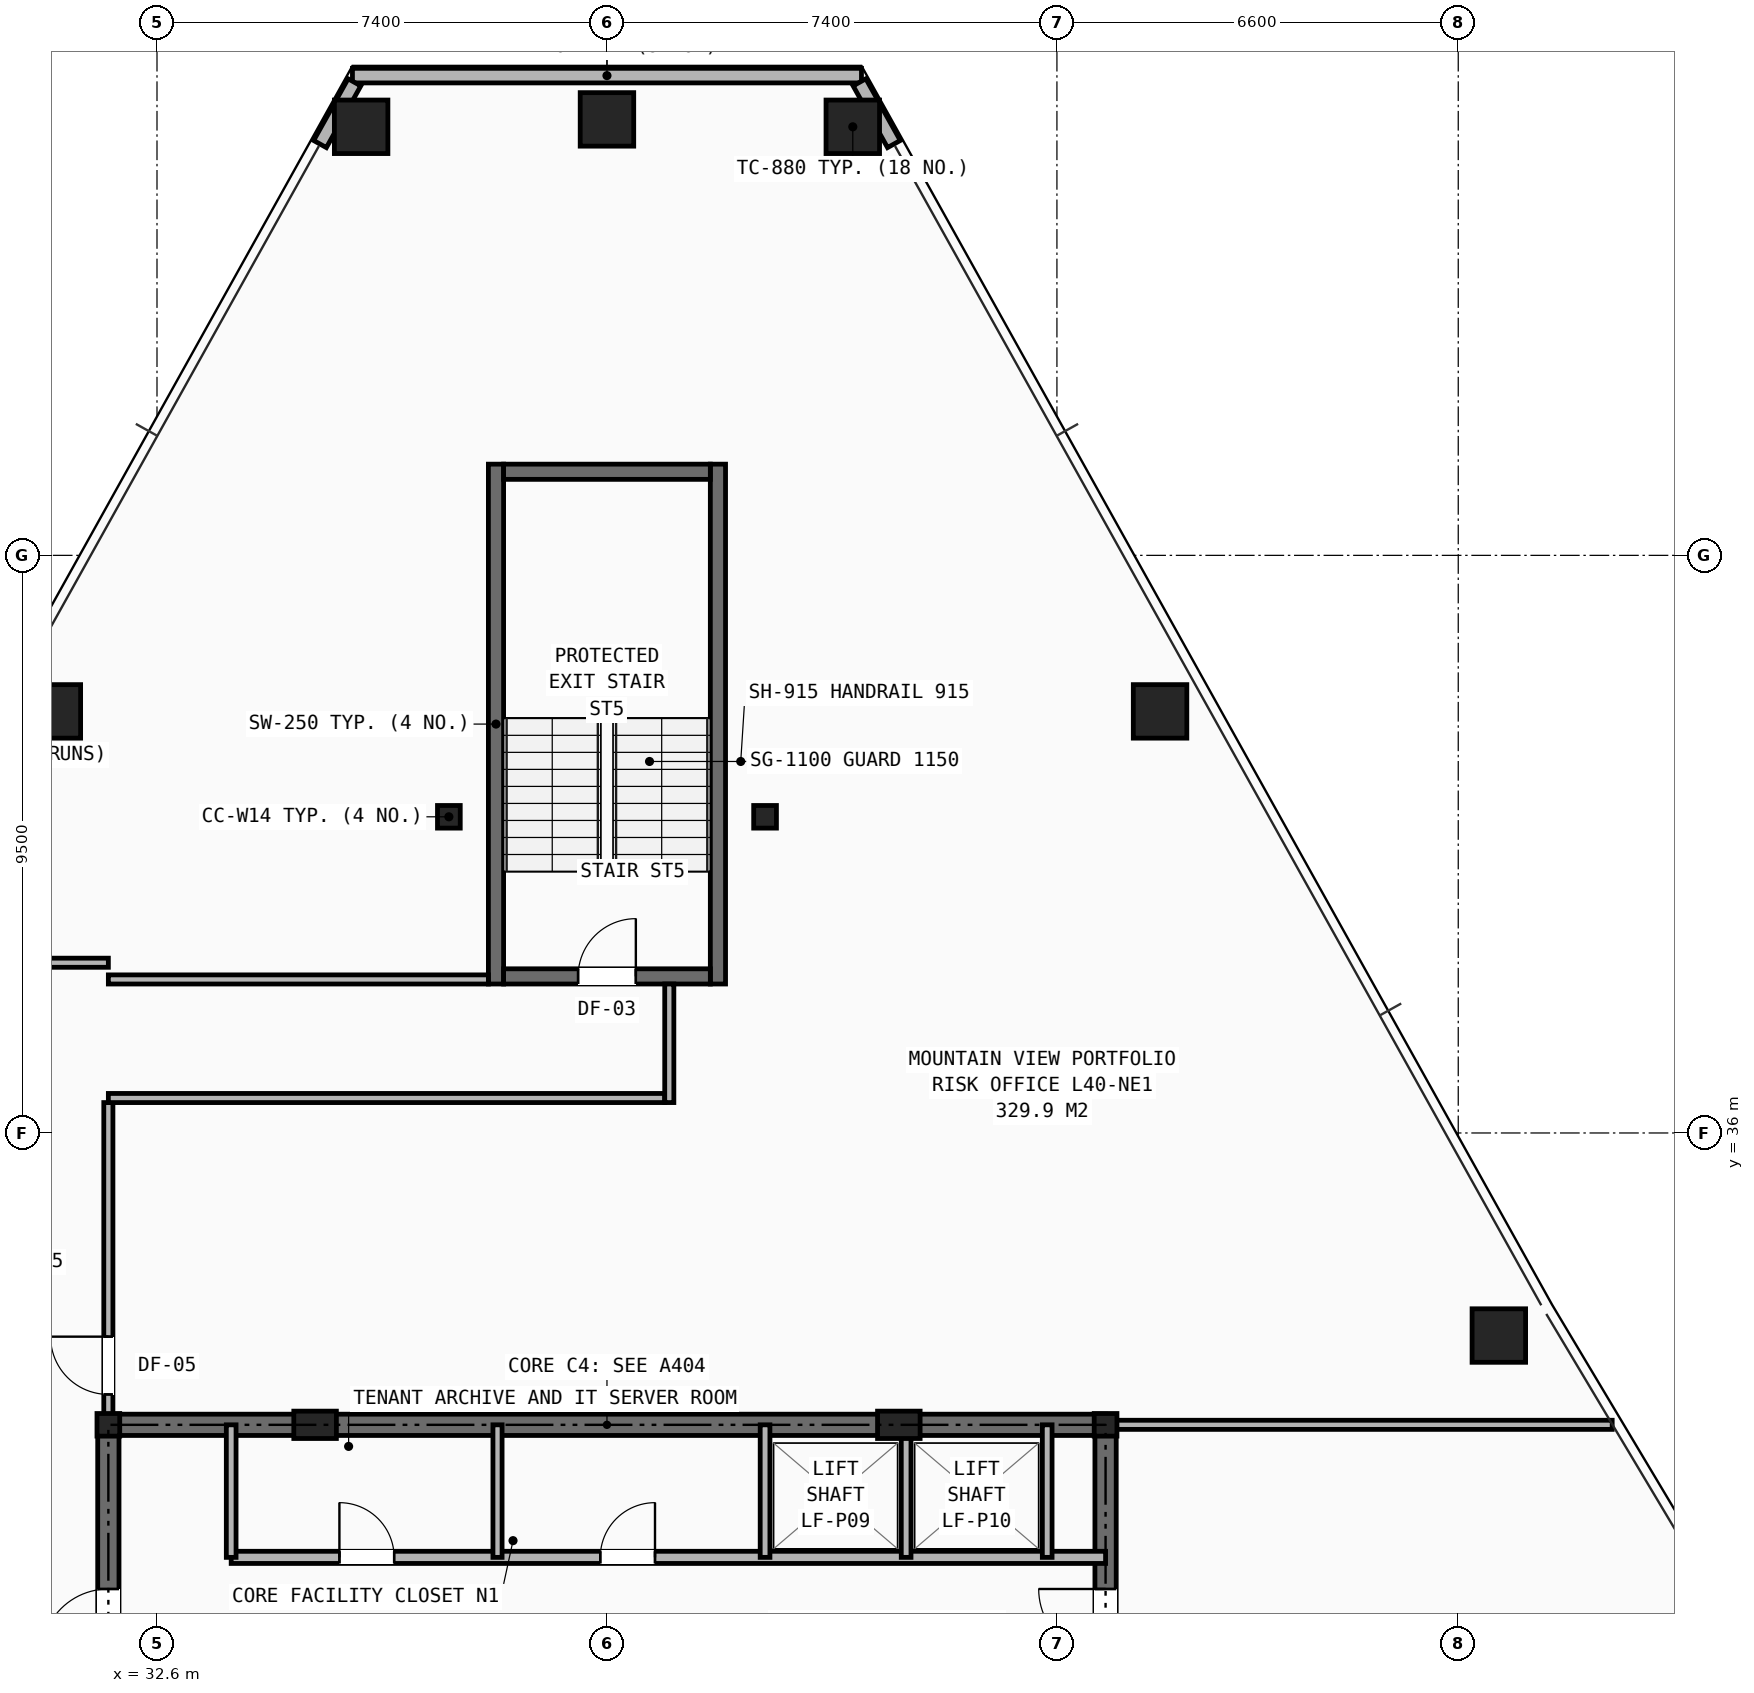
"""IFC4 building model, lengths in metres.
Left out: names, types, materials, properties, quantities, classifications, styles, units other than length and angle.
Written with IfcOpenShell. Run it as: python <this file> out.ifc"""

import sys

from ifc_helpers import new_model, si_unit, direction, frame, frame_2d, origin, origin_2d, place, context, subcontext, project, spatial, rectangle, hollow_rectangle, i_section, extrude, element, fill, save


model = new_model("IFC4")
c1 = context("Model", 3, precision=1e-05, world=origin(), true_north=direction((0.0, 1.0)))
c2 = subcontext(c1, "Body", "Model", "MODEL_VIEW")
j1 = project(units=[si_unit("LENGTHUNIT", "METRE"), si_unit("PLANEANGLEUNIT", "RADIAN")], contexts=[c1])
p1 = place(None, origin())
s1 = spatial("IfcSite", under=j1, at=p1, CompositionType="ELEMENT")
p2 = place(p1, origin())
s2 = spatial("IfcBuilding", under=s1, at=p2, CompositionType="ELEMENT")
p3 = place(p2, frame((0.0, 0.0, 140.15)))
s3 = spatial("IfcBuildingStorey", under=s2, at=p3, CompositionType="ELEMENT", Elevation=140.15)
for number, where, z_axis, x_axis in (
    (1, (31.8, 31.2, 0.0), (0.0, 0.0, 1.0), (1.0, 0.0, 0.0)),
    (2, (48.2, 31.2, 0.0), (0.0, 0.0, 1.0), (1.0, 0.0, 0.0)),
    (3, (37.4, 41.2, 0.0), (0.0, 0.0, 1.0), (1.0, 0.0, 0.0)),
    (4, (42.6, 41.2, 0.0), (0.0, 0.0, 1.0), (1.0, 0.0, 0.0)),
):
    element("IfcColumn", number, at=place(p3, frame(where, z_axis=z_axis, x_axis=x_axis)), inside=s3, PredefinedType="COLUMN", context=c2, shape_type="SweptSolid", body=[
        extrude(i_section(OverallWidth=0.374, OverallDepth=0.372, WebThickness=0.016, FlangeThickness=0.026, at=origin_2d()), origin(), (0.0, 0.0, 1.0), 3.45),
    ])
for number, where, z_axis, x_axis in (
    (5, (35.2, 31.2, 0.0), (0.0, 0.0, 1.0), (1.0, 0.0, 0.0)),
    (6, (44.8, 31.2, 0.0), (0.0, 0.0, 1.0), (1.0, 0.0, 0.0)),
):
    element("IfcColumn", number, at=place(p3, frame(where, z_axis=z_axis, x_axis=x_axis)), inside=s3, PredefinedType="PILASTER", context=c2, shape_type="SweptSolid", body=[
        extrude(rectangle(XDim=0.7, YDim=0.45, at=origin_2d()), origin(), (0.0, 0.0, 1.0), 3.45),
    ])
for number, where, z_axis, x_axis in (
    (7, (44.043, 52.548, 0.0), (0.0, 0.0, 1.0), (1.0, 0.0, 0.0)),
    (8, (40.0, 52.67, 0.0), (0.0, 0.0, 1.0), (1.0, 0.0, 0.0)),
    (9, (35.957, 52.548, 0.0), (0.0, 0.0, 1.0), (1.0, 0.0, 0.0)),
    (10, (30.904, 42.934, 0.0), (0.0, 0.0, 1.0), (1.0, 0.0, 0.0)),
    (11, (54.667, 32.668, 0.0), (0.0, 0.0, 1.0), (1.0, 0.0, 0.0)),
    (12, (49.096, 42.934, 0.0), (0.0, 0.0, 1.0), (1.0, 0.0, 0.0)),
):
    element("IfcColumn", number, at=place(p3, frame(where, z_axis=z_axis, x_axis=x_axis)), inside=s3, PredefinedType="COLUMN", context=c2, shape_type="SweptSolid", body=[
        extrude(hollow_rectangle(XDim=0.88, YDim=0.88, WallThickness=0.06, at=origin_2d()), origin(), (0.0, 0.0, 1.0), 3.45),
    ])
p4 = place(p3, frame((35.814, 53.39, 0.0), z_axis=(0.0, 0.0, 1.0), x_axis=(1.0, 0.0, 0.0)))
e13 = element("IfcWall", 13, at=p4, inside=s3, PredefinedType="SHEAR", context=c2, shape_type="SweptSolid", body=[
    extrude(rectangle(XDim=8.372, YDim=0.24, at=frame_2d((4.186, 0.0))), origin(), (0.0, 0.0, 1.0), 2.583),
])
for number, where, z_axis, x_axis in (
    (14, (35.847, 53.28, 0.0), (0.0, 0.0, 1.0), (-0.487, -0.873, 0.0)),
    (15, (44.719, 52.265, 0.0), (0.0, 0.0, 1.0), (-0.487, 0.873, 0.0)),
):
    element("IfcWall", number, at=place(p3, frame(where, z_axis=z_axis, x_axis=x_axis)), inside=s3, PredefinedType="SHEAR", context=c2, shape_type="SweptSolid", body=[
        extrude(rectangle(XDim=1.162, YDim=0.24, at=frame_2d((0.581, 0.0))), origin(), (0.0, 0.0, 1.0), 2.583),
    ])
p5 = place(p3, frame((31.8, 31.2, 0.0), z_axis=(0.0, 0.0, 1.0), x_axis=(1.0, 0.0, 0.0)))
e16 = element("IfcWall", 16, at=p5, inside=s3, PredefinedType="SHEAR", context=c2, shape_type="SweptSolid", body=[
    extrude(rectangle(XDim=16.4, YDim=0.35, at=frame_2d((8.2, 0.0))), origin(), (0.0, 0.0, 1.0), 3.21),
])
p6 = place(p3, frame((31.8, 16.4, 0.0), z_axis=(0.0, 0.0, 1.0), x_axis=(0.0, 1.0, 0.0)))
e17 = element("IfcWall", 17, at=p6, inside=s3, PredefinedType="SHEAR", context=c2, shape_type="SweptSolid", body=[
    extrude(rectangle(XDim=14.8, YDim=0.35, at=frame_2d((7.4, 0.0))), origin(), (0.0, 0.0, 1.0), 3.21),
])
p7 = place(p6, frame((11.0, 0.0, 0.0)))
e18 = element("IfcOpeningElement", 18, at=p7, cuts=e17, PredefinedType="OPENING", context=c2, shape_type="SweptSolid", body=[
    extrude(rectangle(XDim=1.1, YDim=2.15, at=frame_2d((0.55, 1.075))), frame((0.0, 0.185, 0.0), z_axis=(0.0, -1.0, 0.0), x_axis=(1.0, 0.0, 0.0)), (0.0, 0.0, 1.0), 0.37),
])
p8 = place(p3, frame((48.2, 16.4, 0.0), z_axis=(0.0, 0.0, 1.0), x_axis=(0.0, 1.0, 0.0)))
e19 = element("IfcWall", 19, at=p8, inside=s3, PredefinedType="SHEAR", context=c2, shape_type="SweptSolid", body=[
    extrude(rectangle(XDim=14.8, YDim=0.35, at=frame_2d((7.4, 0.0))), origin(), (0.0, 0.0, 1.0), 3.21),
])
p9 = place(p8, frame((11.0, 0.0, 0.0)))
e20 = element("IfcOpeningElement", 20, at=p9, cuts=e19, PredefinedType="OPENING", context=c2, shape_type="SweptSolid", body=[
    extrude(rectangle(XDim=1.1, YDim=2.15, at=frame_2d((0.55, 1.075))), frame((0.0, 0.185, 0.0), z_axis=(0.0, -1.0, 0.0), x_axis=(1.0, 0.0, 0.0)), (0.0, 0.0, 1.0), 0.37),
])
p10 = place(p3, frame((33.82, 29.02, 0.0), z_axis=(0.0, 0.0, 1.0), x_axis=(1.0, 0.0, 0.0)))
e21 = element("IfcWall", 21, at=p10, inside=s3, PredefinedType="SOLIDWALL", context=c2, shape_type="SweptSolid", body=[
    extrude(rectangle(XDim=14.38, YDim=0.2, at=frame_2d((7.19, 0.0))), origin(), (0.0, 0.0, 1.0), 2.661),
])
p11 = place(p10, frame((1.78, 0.0, 0.0)))
e22 = element("IfcOpeningElement", 22, at=p11, cuts=e21, PredefinedType="OPENING", context=c2, shape_type="SweptSolid", body=[
    extrude(rectangle(XDim=0.9, YDim=2.1, at=frame_2d((0.45, 1.05))), frame((0.0, 0.11, 0.0), z_axis=(0.0, -1.0, 0.0), x_axis=(1.0, 0.0, 0.0)), (0.0, 0.0, 1.0), 0.22),
])
p12 = place(p10, frame((6.07, 0.0, 0.0)))
e23 = element("IfcOpeningElement", 23, at=p12, cuts=e21, PredefinedType="OPENING", context=c2, shape_type="SweptSolid", body=[
    extrude(rectangle(XDim=0.9, YDim=2.1, at=frame_2d((0.45, 1.05))), frame((0.0, 0.11, 0.0), z_axis=(0.0, -1.0, 0.0), x_axis=(1.0, 0.0, 0.0)), (0.0, 0.0, 1.0), 0.22),
])
p13 = place(p3, frame((33.82, 29.02, 0.0), z_axis=(0.0, 0.0, 1.0), x_axis=(0.0, 1.0, 0.0)))
e24 = element("IfcWall", 24, at=p13, inside=s3, PredefinedType="SOLIDWALL", context=c2, shape_type="SweptSolid", body=[
    extrude(rectangle(XDim=2.18, YDim=0.16, at=frame_2d((1.09, 0.0))), origin(), (0.0, 0.0, 1.0), 2.938),
])
p14 = place(p3, frame((38.2, 29.02, 0.0), z_axis=(0.0, 0.0, 1.0), x_axis=(0.0, 1.0, 0.0)))
e25 = element("IfcWall", 25, at=p14, inside=s3, PredefinedType="PARTITIONING", context=c2, shape_type="SweptSolid", body=[
    extrude(rectangle(XDim=2.18, YDim=0.15, at=frame_2d((1.09, 0.0))), origin(), (0.0, 0.0, 1.0), 2.938),
])
for number, where, z_axis, x_axis in (
    (26, (42.6, 29.02, 0.0), (0.0, 0.0, 1.0), (0.0, 1.0, 0.0)),
    (27, (44.92, 29.02, 0.0), (0.0, 0.0, 1.0), (0.0, 1.0, 0.0)),
    (28, (47.24, 29.02, 0.0), (0.0, 0.0, 1.0), (0.0, 1.0, 0.0)),
):
    element("IfcWall", number, at=place(p3, frame(where, z_axis=z_axis, x_axis=x_axis)), inside=s3, PredefinedType="SOLIDWALL", context=c2, shape_type="SweptSolid", body=[
        extrude(rectangle(XDim=2.18, YDim=0.16, at=frame_2d((1.09, 0.0))), origin(), (0.0, 0.0, 1.0), 2.938),
    ])
p15 = place(p3, frame((31.8, 31.2, 0.0), z_axis=(0.0, 0.0, 1.0), x_axis=(0.0, 1.0, 0.0)))
e29 = element("IfcWall", 29, at=p15, inside=s3, PredefinedType="PARTITIONING", context=c2, shape_type="SweptSolid", body=[
    extrude(rectangle(XDim=5.3, YDim=0.15, at=frame_2d((2.65, 0.0))), origin(), (0.0, 0.0, 1.0), 2.252),
])
p16 = place(p15, frame((0.5, 0.0, 0.0)))
e30 = element("IfcOpeningElement", 30, at=p16, cuts=e29, PredefinedType="OPENING", context=c2, shape_type="SweptSolid", body=[
    extrude(rectangle(XDim=0.95, YDim=2.1, at=frame_2d((0.475, 1.05))), frame((0.0, 0.085, 0.0), z_axis=(0.0, -1.0, 0.0), x_axis=(1.0, 0.0, 0.0)), (0.0, 0.0, 1.0), 0.17),
])
p17 = place(p3, frame((29.6, 38.8, 0.0), z_axis=(0.0, 0.0, 1.0), x_axis=(1.0, 0.0, 0.0)))
e31 = element("IfcWall", 31, at=p17, inside=s3, PredefinedType="PARTITIONING", context=c2, shape_type="SweptSolid", body=[
    extrude(rectangle(XDim=2.2, YDim=0.15, at=frame_2d((1.1, 0.0))), origin(), (0.0, 0.0, 1.0), 2.743),
])
p18 = place(p3, frame((48.2, 31.2, 0.0), z_axis=(0.0, 0.0, 1.0), x_axis=(1.0, 0.0, 0.0)))
e32 = element("IfcWall", 32, at=p18, inside=s3, PredefinedType="PARTITIONING", context=c2, shape_type="SweptSolid", body=[
    extrude(rectangle(XDim=8.332, YDim=0.15, at=frame_2d((4.166, 0.0))), origin(), (0.0, 0.0, 1.0), 2.252),
])
for number, where, z_axis, x_axis in (
    (33, (38.175, 38.45, 0.0), (0.0, 0.0, 1.0), (0.0, 1.0, 0.0)),
    (34, (41.825, 38.45, 0.0), (0.0, 0.0, 1.0), (0.0, 1.0, 0.0)),
):
    element("IfcWall", number, at=place(p3, frame(where, z_axis=z_axis, x_axis=x_axis)), inside=s3, PredefinedType="SHEAR", context=c2, shape_type="SweptSolid", body=[
        extrude(rectangle(XDim=8.55, YDim=0.25, at=frame_2d((4.275, 0.0))), origin(), (0.0, 0.0, 1.0), 3.21),
    ])
p19 = place(p3, frame((38.3, 38.575, 0.0), z_axis=(0.0, 0.0, 1.0), x_axis=(1.0, 0.0, 0.0)))
e35 = element("IfcWall", 35, at=p19, inside=s3, PredefinedType="SHEAR", context=c2, shape_type="SweptSolid", body=[
    extrude(rectangle(XDim=3.4, YDim=0.25, at=frame_2d((1.7, 0.0))), origin(), (0.0, 0.0, 1.0), 3.21),
])
p20 = place(p19, frame((1.225, 0.0, 0.0)))
e36 = element("IfcOpeningElement", 36, at=p20, cuts=e35, PredefinedType="OPENING", context=c2, shape_type="SweptSolid", body=[
    extrude(rectangle(XDim=0.95, YDim=2.1, at=frame_2d((0.475, 1.05))), frame((0.0, 0.135, 0.0), z_axis=(0.0, -1.0, 0.0), x_axis=(1.0, 0.0, 0.0)), (0.0, 0.0, 1.0), 0.27),
])
p21 = place(p3, frame((38.3, 46.875, 0.0), z_axis=(0.0, 0.0, 1.0), x_axis=(1.0, 0.0, 0.0)))
e37 = element("IfcWall", 37, at=p21, inside=s3, PredefinedType="SHEAR", context=c2, shape_type="SweptSolid", body=[
    extrude(rectangle(XDim=3.4, YDim=0.25, at=frame_2d((1.7, 0.0))), origin(), (0.0, 0.0, 1.0), 3.21),
])
p22 = place(p3, frame((31.8, 36.575, 0.0), z_axis=(0.0, 0.0, 1.0), x_axis=(1.0, 0.0, 0.0)))
e38 = element("IfcWall", 38, at=p22, inside=s3, PredefinedType="PARTITIONING", context=c2, shape_type="SweptSolid", body=[
    extrude(rectangle(XDim=9.15, YDim=0.15, at=frame_2d((4.575, 0.0))), origin(), (0.0, 0.0, 1.0), 3.21),
])
p23 = place(p3, frame((31.8, 38.525, 0.0), z_axis=(0.0, 0.0, 1.0), x_axis=(1.0, 0.0, 0.0)))
e39 = element("IfcWall", 39, at=p23, inside=s3, PredefinedType="PARTITIONING", context=c2, shape_type="SweptSolid", body=[
    extrude(rectangle(XDim=6.25, YDim=0.15, at=frame_2d((3.125, 0.0))), origin(), (0.0, 0.0, 1.0), 2.743),
])
p24 = place(p3, frame((41.025, 36.5, 0.0), z_axis=(0.0, 0.0, 1.0), x_axis=(0.0, 1.0, 0.0)))
e40 = element("IfcWall", 40, at=p24, inside=s3, PredefinedType="PARTITIONING", context=c2, shape_type="SweptSolid", body=[
    extrude(rectangle(XDim=1.95, YDim=0.15, at=frame_2d((0.975, 0.0))), origin(), (0.0, 0.0, 1.0), 3.21),
])
p25 = place(p7, origin())
e41 = element("IfcDoor", 41, at=p25, inside=s3, OperationType="SINGLE_SWING_LEFT", PredefinedType="DOOR", context=c2, shape_type="SweptSolid", body=[
    extrude(rectangle(XDim=1.1, YDim=2.15, at=frame_2d((0.55, 1.075))), frame((0.0, 0.025, 0.0), z_axis=(0.0, -1.0, 0.0), x_axis=(1.0, 0.0, 0.0)), (0.0, 0.0, 1.0), 0.05),
])
fill(e18, e41)
p26 = place(p9, origin())
e42 = element("IfcDoor", 42, at=p26, inside=s3, OperationType="SINGLE_SWING_RIGHT", PredefinedType="DOOR", context=c2, shape_type="SweptSolid", body=[
    extrude(rectangle(XDim=1.1, YDim=2.15, at=frame_2d((0.55, 1.075))), frame((0.0, 0.025, 0.0), z_axis=(0.0, -1.0, 0.0), x_axis=(1.0, 0.0, 0.0)), (0.0, 0.0, 1.0), 0.05),
])
fill(e20, e42)
p27 = place(p11, origin())
e43 = element("IfcDoor", 43, at=p27, inside=s3, OperationType="SINGLE_SWING_LEFT", PredefinedType="DOOR", context=c2, shape_type="SweptSolid", body=[
    extrude(rectangle(XDim=0.9, YDim=2.1, at=frame_2d((0.45, 1.05))), frame((0.0, 0.025, 0.0), z_axis=(0.0, -1.0, 0.0), x_axis=(1.0, 0.0, 0.0)), (0.0, 0.0, 1.0), 0.05),
])
fill(e22, e43)
p28 = place(p12, origin())
e44 = element("IfcDoor", 44, at=p28, inside=s3, OperationType="SINGLE_SWING_RIGHT", PredefinedType="DOOR", context=c2, shape_type="SweptSolid", body=[
    extrude(rectangle(XDim=0.9, YDim=2.1, at=frame_2d((0.45, 1.05))), frame((0.0, 0.025, 0.0), z_axis=(0.0, -1.0, 0.0), x_axis=(1.0, 0.0, 0.0)), (0.0, 0.0, 1.0), 0.05),
])
fill(e23, e44)
p29 = place(p16, origin())
e45 = element("IfcDoor", 45, at=p29, inside=s3, OperationType="SINGLE_SWING_RIGHT", PredefinedType="DOOR", context=c2, shape_type="SweptSolid", body=[
    extrude(rectangle(XDim=0.95, YDim=2.1, at=frame_2d((0.475, 1.05))), frame((0.0, 0.025, 0.0), z_axis=(0.0, -1.0, 0.0), x_axis=(1.0, 0.0, 0.0)), (0.0, 0.0, 1.0), 0.05),
])
fill(e30, e45)
p30 = place(p20, origin())
e46 = element("IfcDoor", 46, at=p30, inside=s3, OperationType="SINGLE_SWING_RIGHT", PredefinedType="DOOR", context=c2, shape_type="SweptSolid", body=[
    extrude(rectangle(XDim=0.95, YDim=2.1, at=frame_2d((0.475, 1.05))), frame((0.0, 0.025, 0.0), z_axis=(0.0, -1.0, 0.0), x_axis=(1.0, 0.0, 0.0)), (0.0, 0.0, 1.0), 0.05),
])
fill(e36, e46)
save(model, sys.argv[1])
